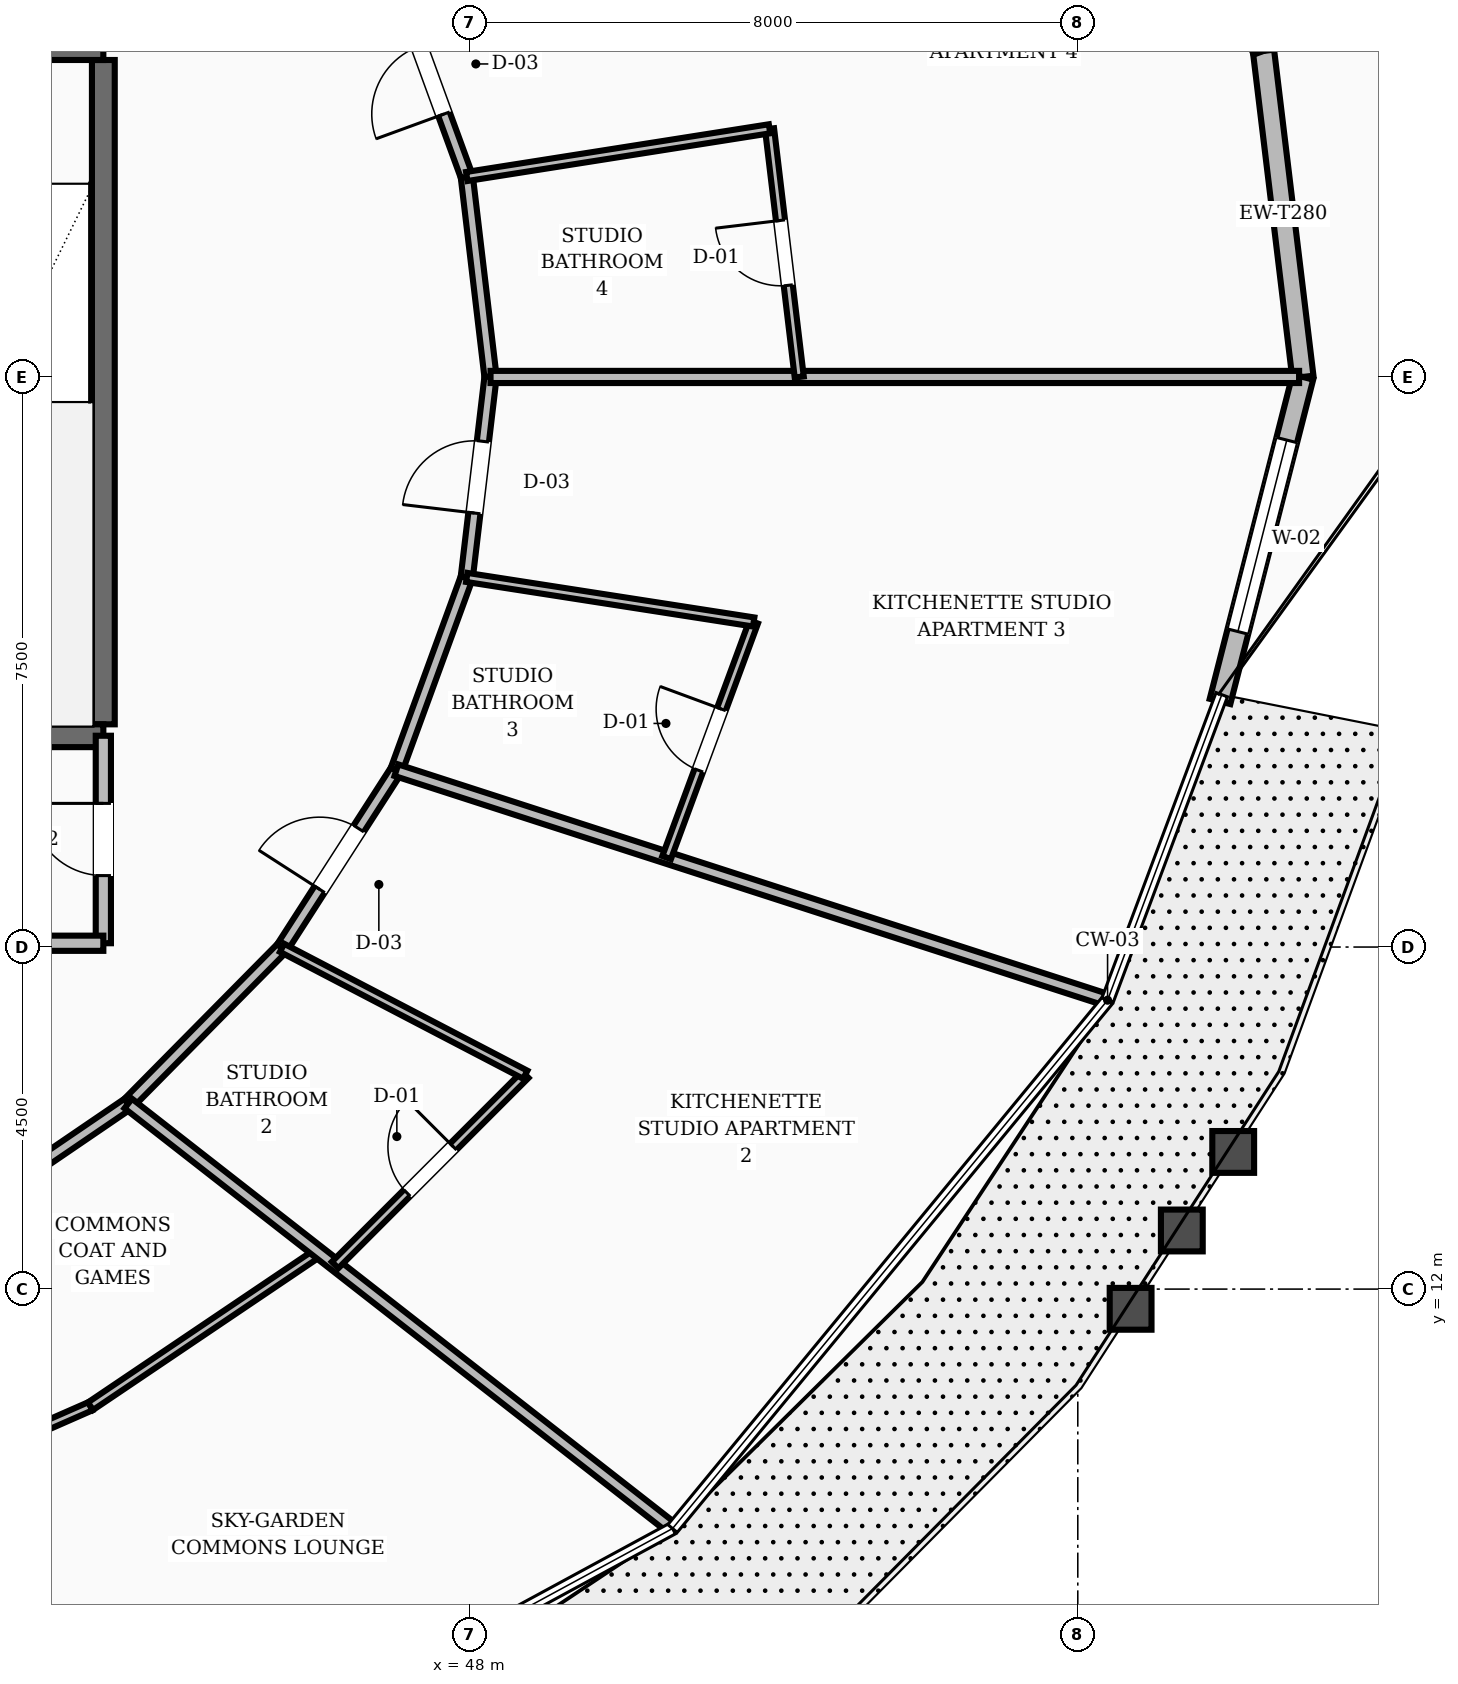
"""IFC4 building model, lengths in metres.
Left out: names, types, materials, properties, quantities, classifications, styles, units other than length and angle.
Written with IfcOpenShell. Run it as: python <this file> out.ifc"""

import sys

from ifc_helpers import new_model, si_unit, direction, frame, frame_2d, origin, place, context, subcontext, project, spatial, rectangle, extrude, element, fill, save


model = new_model("IFC4")
c1 = context("Model", 3, precision=1e-05, world=origin(), true_north=direction((0.0, 1.0)))
c2 = subcontext(c1, "Body", "Model", "MODEL_VIEW")
j1 = project(units=[si_unit("LENGTHUNIT", "METRE"), si_unit("PLANEANGLEUNIT", "RADIAN")], contexts=[c1])
p1 = place(None, origin())
s1 = spatial("IfcSite", under=j1, at=p1, CompositionType="ELEMENT")
p2 = place(p1, origin())
s2 = spatial("IfcBuilding", under=s1, at=p2, CompositionType="ELEMENT")
p3 = place(p2, frame((0.0, 0.0, 91.6)))
s3 = spatial("IfcBuildingStorey", under=s2, at=p3, CompositionType="ELEMENT", Elevation=91.6)
p4 = place(p3, frame((43.18, 19.43, 0.0), z_axis=(0.0, 0.0, 1.0), x_axis=(0.0, 1.0, 0.0)))
e1 = element("IfcWall", 1, at=p4, inside=s3, PredefinedType="SHEAR", context=c2, shape_type="SweptSolid", body=[
    extrude(rectangle(XDim=8.74, YDim=0.3, at=frame_2d((4.37, 0.0))), origin(), (0.0, 0.0, 1.0), 3.6),
])
p5 = place(p3, frame((39.58, 19.28, 0.0), z_axis=(0.0, 0.0, 1.0), x_axis=(1.0, 0.0, 0.0)))
e2 = element("IfcWall", 2, at=p5, inside=s3, PredefinedType="SHEAR", context=c2, shape_type="SweptSolid", body=[
    extrude(rectangle(XDim=3.6, YDim=0.3, at=frame_2d((1.8, 0.0))), origin(), (0.0, 0.0, 1.0), 3.6),
])
p6 = place(p3, frame((39.58, 28.32, 0.0), z_axis=(0.0, 0.0, 1.0), x_axis=(1.0, 0.0, 0.0)))
e3 = element("IfcWall", 3, at=p6, inside=s3, PredefinedType="SHEAR", context=c2, shape_type="SweptSolid", body=[
    extrude(rectangle(XDim=3.6, YDim=0.3, at=frame_2d((1.8, 0.0))), origin(), (0.0, 0.0, 1.0), 3.6),
])
p7 = place(p6, frame((1.3, 0.0, 0.0)))
e4 = element("IfcOpeningElement", 4, at=p7, cuts=e3, PredefinedType="OPENING", context=c2, shape_type="SweptSolid", body=[
    extrude(rectangle(XDim=1.1, YDim=2.1, at=frame_2d((0.55, 1.05))), frame((0.0, 0.16, 0.0), z_axis=(0.0, -1.0, 0.0), x_axis=(1.0, 0.0, 0.0)), (0.0, 0.0, 1.0), 0.32),
])
p8 = place(p3, frame((58.961, 24.0, 0.0), z_axis=(0.0, 0.0, 1.0), x_axis=(-0.11991619344, 0.992784018078, 0.0)))
e5 = element("IfcWall", 5, at=p8, inside=s3, PredefinedType="STANDARD", context=c2, shape_type="SweptSolid", body=[
    extrude(rectangle(XDim=4.32, YDim=0.28, at=frame_2d((2.16, 0.0))), origin(), (0.0, 0.0, 1.0), 2.71),
])
p9 = place(p3, frame((58.443, 28.289, 0.0), z_axis=(0.0, 0.0, 1.0), x_axis=(-0.348647575397, 0.937253897388, 0.0)))
e6 = element("IfcWall", 6, at=p9, inside=s3, PredefinedType="STANDARD", context=c2, shape_type="SweptSolid", body=[
    extrude(rectangle(XDim=4.4, YDim=0.28, at=frame_2d((2.2, 0.0))), origin(), (0.0, 0.0, 1.0), 2.71),
])
p10 = place(p9, frame((0.6, 0.0, 0.8)))
e7 = element("IfcOpeningElement", 7, at=p10, cuts=e6, PredefinedType="OPENING", context=c2, shape_type="SweptSolid", body=[
    extrude(rectangle(XDim=3.2, YDim=1.65, at=frame_2d((1.6, 0.825))), frame((0.0, 0.15, 0.0), z_axis=(0.0, -1.0, 0.0), x_axis=(1.0, 0.0, 0.0)), (0.0, 0.0, 1.0), 0.3),
])
p11 = place(p3, frame((57.871, 19.731, 0.0), z_axis=(0.0, 0.0, 1.0), x_axis=(0.247421985174, 0.968907818759, 0.0)))
e8 = element("IfcWall", 8, at=p11, inside=s3, PredefinedType="STANDARD", context=c2, shape_type="SweptSolid", body=[
    extrude(rectangle(XDim=4.406, YDim=0.28, at=frame_2d((2.203, 0.0))), origin(), (0.0, 0.0, 1.0), 2.71),
])
p12 = place(p11, frame((0.949, 0.0, 0.8)))
e9 = element("IfcOpeningElement", 9, at=p12, cuts=e8, PredefinedType="OPENING", context=c2, shape_type="SweptSolid", body=[
    extrude(rectangle(XDim=2.6, YDim=1.65, at=frame_2d((1.3, 0.825))), frame((0.0, 0.15, 0.0), z_axis=(0.0, -1.0, 0.0), x_axis=(1.0, 0.0, 0.0)), (0.0, 0.0, 1.0), 0.3),
])
p13 = place(p3, frame((43.18, 16.55, 0.0), z_axis=(0.0, 0.0, 1.0), x_axis=(0.0, 1.0, 0.0)))
e10 = element("IfcWall", 10, at=p13, inside=s3, PredefinedType="SOLIDWALL", context=c2, shape_type="SweptSolid", body=[
    extrude(rectangle(XDim=2.73, YDim=0.2, at=frame_2d((1.365, 0.0))), origin(), (0.0, 0.0, 1.0), 2.71),
])
p14 = place(p13, frame((0.89, 0.0, 0.0)))
e11 = element("IfcOpeningElement", 11, at=p14, cuts=e10, PredefinedType="OPENING", context=c2, shape_type="SweptSolid", body=[
    extrude(rectangle(XDim=0.95, YDim=2.1, at=frame_2d((0.475, 1.05))), frame((0.0, 0.11, 0.0), z_axis=(0.0, -1.0, 0.0), x_axis=(1.0, 0.0, 0.0)), (0.0, 0.0, 1.0), 0.22),
])
p15 = place(p3, frame((39.2, 16.55, 0.0), z_axis=(0.0, 0.0, 1.0), x_axis=(1.0, 0.0, 0.0)))
e12 = element("IfcWall", 12, at=p15, inside=s3, PredefinedType="SOLIDWALL", context=c2, shape_type="SweptSolid", body=[
    extrude(rectangle(XDim=3.98, YDim=0.2, at=frame_2d((1.99, 0.0))), origin(), (0.0, 0.0, 1.0), 2.71),
])
p16 = place(p3, frame((48.274, 24.0, 0.0), z_axis=(0.0, 0.0, 1.0), x_axis=(-0.117763961213, 0.99304161516, 0.0)))
e13 = element("IfcWall", 13, at=p16, inside=s3, PredefinedType="SOLIDWALL", context=c2, shape_type="SweptSolid", body=[
    extrude(rectangle(XDim=2.656, YDim=0.16, at=frame_2d((1.328, 0.0))), origin(), (0.0, 0.0, 1.0), 2.71),
])
p17 = place(p3, frame((47.961, 26.637, 0.0), z_axis=(0.0, 0.0, 1.0), x_axis=(-0.343013437329, 0.939330496583, 0.0)))
e14 = element("IfcWall", 14, at=p17, inside=s3, PredefinedType="SOLIDWALL", context=c2, shape_type="SweptSolid", body=[
    extrude(rectangle(XDim=2.7, YDim=0.16, at=frame_2d((1.35, 0.0))), origin(), (0.0, 0.0, 1.0), 2.71),
])
p18 = place(p17, frame((0.875, 0.0, 0.0)))
e15 = element("IfcOpeningElement", 15, at=p18, cuts=e14, PredefinedType="OPENING", context=c2, shape_type="SweptSolid", body=[
    extrude(rectangle(XDim=0.95, YDim=2.1, at=frame_2d((0.475, 1.05))), frame((0.0, 0.09, 0.0), z_axis=(0.0, -1.0, 0.0), x_axis=(1.0, 0.0, 0.0)), (0.0, 0.0, 1.0), 0.18),
])
p19 = place(p3, frame((41.041, 12.76, 0.0), z_axis=(0.0, 0.0, 1.0), x_axis=(0.826293096206, 0.56324037423, 0.0)))
e16 = element("IfcWall", 16, at=p19, inside=s3, PredefinedType="SOLIDWALL", context=c2, shape_type="SweptSolid", body=[
    extrude(rectangle(XDim=2.985, YDim=0.16, at=frame_2d((1.492, 0.0))), origin(), (0.0, 0.0, 1.0), 2.71),
])
p20 = place(p3, frame((43.508, 14.441, 0.0), z_axis=(0.0, 0.0, 1.0), x_axis=(0.702811997, 0.711375636969, 0.0)))
e17 = element("IfcWall", 17, at=p20, inside=s3, PredefinedType="SOLIDWALL", context=c2, shape_type="SweptSolid", body=[
    extrude(rectangle(XDim=2.879, YDim=0.16, at=frame_2d((1.44, 0.0))), origin(), (0.0, 0.0, 1.0), 2.71),
])
p21 = place(p3, frame((45.531, 16.49, 0.0), z_axis=(0.0, 0.0, 1.0), x_axis=(0.541126045017, 0.840941498206, 0.0)))
e18 = element("IfcWall", 18, at=p21, inside=s3, PredefinedType="SOLIDWALL", context=c2, shape_type="SweptSolid", body=[
    extrude(rectangle(XDim=2.779, YDim=0.16, at=frame_2d((1.39, 0.0))), origin(), (0.0, 0.0, 1.0), 2.71),
])
p22 = place(p21, frame((0.915, 0.0, 0.0)))
e19 = element("IfcOpeningElement", 19, at=p22, cuts=e18, PredefinedType="OPENING", context=c2, shape_type="SweptSolid", body=[
    extrude(rectangle(XDim=0.95, YDim=2.1, at=frame_2d((0.475, 1.05))), frame((0.0, 0.09, 0.0), z_axis=(0.0, -1.0, 0.0), x_axis=(1.0, 0.0, 0.0)), (0.0, 0.0, 1.0), 0.18),
])
p23 = place(p3, frame((47.035, 18.827, 0.0), z_axis=(0.0, 0.0, 1.0), x_axis=(0.343013437329, 0.939330496583, 0.0)))
e20 = element("IfcWall", 20, at=p23, inside=s3, PredefinedType="SOLIDWALL", context=c2, shape_type="SweptSolid", body=[
    extrude(rectangle(XDim=2.7, YDim=0.16, at=frame_2d((1.35, 0.0))), origin(), (0.0, 0.0, 1.0), 2.71),
])
p24 = place(p3, frame((47.961, 21.363, 0.0), z_axis=(0.0, 0.0, 1.0), x_axis=(0.117763961213, 0.99304161516, 0.0)))
e21 = element("IfcWall", 21, at=p24, inside=s3, PredefinedType="SOLIDWALL", context=c2, shape_type="SweptSolid", body=[
    extrude(rectangle(XDim=2.656, YDim=0.16, at=frame_2d((1.328, 0.0))), origin(), (0.0, 0.0, 1.0), 2.71),
])
p25 = place(p24, frame((0.853, 0.0, 0.0)))
e22 = element("IfcOpeningElement", 22, at=p25, cuts=e21, PredefinedType="OPENING", context=c2, shape_type="SweptSolid", body=[
    extrude(rectangle(XDim=0.95, YDim=2.1, at=frame_2d((0.475, 1.05))), frame((0.0, 0.09, 0.0), z_axis=(0.0, -1.0, 0.0), x_axis=(1.0, 0.0, 0.0)), (0.0, 0.0, 1.0), 0.18),
])
p26 = place(p3, frame((39.584, 8.954, 0.0), z_axis=(0.0, 0.0, 1.0), x_axis=(0.915554398316, 0.402194161723, 0.0)))
e23 = element("IfcWall", 23, at=p26, inside=s3, PredefinedType="PARTITIONING", context=c2, shape_type="SweptSolid", body=[
    extrude(rectangle(XDim=3.742, YDim=0.12, at=frame_2d((1.871, 0.0))), origin(), (0.0, 0.0, 1.0), 2.71),
])
p27 = place(p3, frame((43.01, 10.459, 0.0), z_axis=(0.0, 0.0, 1.0), x_axis=(0.829125166248, 0.559063018536, 0.0)))
e24 = element("IfcWall", 24, at=p27, inside=s3, PredefinedType="PARTITIONING", context=c2, shape_type="SweptSolid", body=[
    extrude(rectangle(XDim=3.622, YDim=0.12, at=frame_2d((1.811, 0.0))), origin(), (0.0, 0.0, 1.0), 2.71),
])
p28 = place(p3, frame((43.508, 14.441, 0.0), z_axis=(0.0, 0.0, 1.0), x_axis=(0.788218918979, -0.615394942914, 0.0)))
e25 = element("IfcWall", 25, at=p28, inside=s3, PredefinedType="SOLIDWALL", context=c2, shape_type="SweptSolid", body=[
    extrude(rectangle(XDim=9.035, YDim=0.16, at=frame_2d((4.518, 0.0))), origin(), (0.0, 0.0, 1.0), 2.71),
])
p29 = place(p3, frame((46.229, 12.317, 0.0), z_axis=(0.0, 0.0, 1.0), x_axis=(0.7068998534, 0.707313648436, 0.0)))
e26 = element("IfcWall", 26, at=p29, inside=s3, PredefinedType="PARTITIONING", context=c2, shape_type="SweptSolid", body=[
    extrude(rectangle(XDim=3.54, YDim=0.12, at=frame_2d((1.77, 0.0))), origin(), (0.0, 0.0, 1.0), 2.71),
])
p30 = place(p29, frame((1.34, 0.0, 0.0)))
e27 = element("IfcOpeningElement", 27, at=p30, cuts=e26, PredefinedType="OPENING", context=c2, shape_type="SweptSolid", body=[
    extrude(rectangle(XDim=0.86, YDim=2.1, at=frame_2d((0.43, 1.05))), frame((0.0, 0.07, 0.0), z_axis=(0.0, -1.0, 0.0), x_axis=(1.0, 0.0, 0.0)), (0.0, 0.0, 1.0), 0.14),
])
p31 = place(p3, frame((45.531, 16.49, 0.0), z_axis=(0.0, 0.0, 1.0), x_axis=(0.886624645958, -0.462489715756, 0.0)))
e28 = element("IfcWall", 28, at=p31, inside=s3, PredefinedType="PARTITIONING", context=c2, shape_type="SweptSolid", body=[
    extrude(rectangle(XDim=3.609, YDim=0.12, at=frame_2d((1.805, 0.0))), origin(), (0.0, 0.0, 1.0), 2.71),
])
p32 = place(p3, frame((47.035, 18.827, 0.0), z_axis=(0.0, 0.0, 1.0), x_axis=(0.951482342418, -0.307703350757, 0.0)))
e29 = element("IfcWall", 29, at=p32, inside=s3, PredefinedType="SOLIDWALL", context=c2, shape_type="SweptSolid", body=[
    extrude(rectangle(XDim=9.784, YDim=0.16, at=frame_2d((4.892, 0.0))), origin(), (0.0, 0.0, 1.0), 2.71),
])
p33 = place(p3, frame((50.591, 17.677, 0.0), z_axis=(0.0, 0.0, 1.0), x_axis=(0.346520124716, 0.938042538037, 0.0)))
e30 = element("IfcWall", 30, at=p33, inside=s3, PredefinedType="PARTITIONING", context=c2, shape_type="SweptSolid", body=[
    extrude(rectangle(XDim=3.304, YDim=0.12, at=frame_2d((1.652, 0.0))), origin(), (0.0, 0.0, 1.0), 2.71),
])
p34 = place(p33, frame((1.222, 0.0, 0.0)))
e31 = element("IfcOpeningElement", 31, at=p34, cuts=e30, PredefinedType="OPENING", context=c2, shape_type="SweptSolid", body=[
    extrude(rectangle(XDim=0.86, YDim=2.1, at=frame_2d((0.43, 1.05))), frame((0.0, 0.07, 0.0), z_axis=(0.0, -1.0, 0.0), x_axis=(1.0, 0.0, 0.0)), (0.0, 0.0, 1.0), 0.14),
])
p35 = place(p3, frame((47.961, 21.363, 0.0), z_axis=(0.0, 0.0, 1.0), x_axis=(0.988155696558, -0.153454616612, 0.0)))
e32 = element("IfcWall", 32, at=p35, inside=s3, PredefinedType="PARTITIONING", context=c2, shape_type="SweptSolid", body=[
    extrude(rectangle(XDim=3.82, YDim=0.12, at=frame_2d((1.91, 0.0))), origin(), (0.0, 0.0, 1.0), 2.71),
])
p36 = place(p3, frame((48.274, 24.0, 0.0), z_axis=(0.0, 0.0, 1.0), x_axis=(1.0, 0.0, 0.0)))
e33 = element("IfcWall", 33, at=p36, inside=s3, PredefinedType="SOLIDWALL", context=c2, shape_type="SweptSolid", body=[
    extrude(rectangle(XDim=10.638, YDim=0.16, at=frame_2d((5.319, 0.0))), origin(), (0.0, 0.0, 1.0), 2.71),
])
p37 = place(p3, frame((52.335, 24.0, 0.0), z_axis=(0.0, 0.0, 1.0), x_axis=(-0.118796809784, 0.992918585779, 0.0)))
e34 = element("IfcWall", 34, at=p37, inside=s3, PredefinedType="PARTITIONING", context=c2, shape_type="SweptSolid", body=[
    extrude(rectangle(XDim=3.288, YDim=0.12, at=frame_2d((1.644, 0.0))), origin(), (0.0, 0.0, 1.0), 2.71),
])
p38 = place(p37, frame((1.214, 0.0, 0.0)))
e35 = element("IfcOpeningElement", 35, at=p38, cuts=e34, PredefinedType="OPENING", context=c2, shape_type="SweptSolid", body=[
    extrude(rectangle(XDim=0.86, YDim=2.1, at=frame_2d((0.43, 1.05))), frame((0.0, 0.07, 0.0), z_axis=(0.0, -1.0, 0.0), x_axis=(1.0, 0.0, 0.0)), (0.0, 0.0, 1.0), 0.14),
])
p39 = place(p3, frame((47.961, 26.637, 0.0), z_axis=(0.0, 0.0, 1.0), x_axis=(0.987811515009, 0.155654780895, 0.0)))
e36 = element("IfcWall", 36, at=p39, inside=s3, PredefinedType="PARTITIONING", context=c2, shape_type="SweptSolid", body=[
    extrude(rectangle(XDim=4.032, YDim=0.12, at=frame_2d((2.016, 0.0))), origin(), (0.0, 0.0, 1.0), 2.71),
])
p40 = place(p12, origin())
e37 = element("IfcWindow", 37, at=p40, inside=s3, PartitioningType="SINGLE_PANEL", PredefinedType="WINDOW", context=c2, shape_type="SweptSolid", body=[
    extrude(rectangle(XDim=2.6, YDim=1.65, at=frame_2d((1.3, 0.825))), frame((0.0, 0.03, 0.0), z_axis=(0.0, -1.0, 0.0), x_axis=(1.0, 0.0, 0.0)), (0.0, 0.0, 1.0), 0.06),
])
fill(e9, e37)
p41 = place(p14, origin())
e38 = element("IfcDoor", 38, at=p41, inside=s3, OperationType="SINGLE_SWING_RIGHT", PredefinedType="DOOR", context=c2, shape_type="SweptSolid", body=[
    extrude(rectangle(XDim=0.95, YDim=2.1, at=frame_2d((0.475, 1.05))), frame((0.0, 0.025, 0.0), z_axis=(0.0, -1.0, 0.0), x_axis=(1.0, 0.0, 0.0)), (0.0, 0.0, 1.0), 0.05),
])
fill(e11, e38)
p42 = place(p30, origin())
e39 = element("IfcDoor", 39, at=p42, inside=s3, OperationType="SINGLE_SWING_RIGHT", PredefinedType="DOOR", context=c2, shape_type="SweptSolid", body=[
    extrude(rectangle(XDim=0.86, YDim=2.1, at=frame_2d((0.43, 1.05))), frame((0.0, 0.025, 0.0), z_axis=(0.0, -1.0, 0.0), x_axis=(1.0, 0.0, 0.0)), (0.0, 0.0, 1.0), 0.05),
])
fill(e27, e39)
p43 = place(p22, origin())
e40 = element("IfcDoor", 40, at=p43, inside=s3, OperationType="SINGLE_SWING_LEFT", PredefinedType="DOOR", context=c2, shape_type="SweptSolid", body=[
    extrude(rectangle(XDim=0.95, YDim=2.1, at=frame_2d((0.475, 1.05))), frame((0.0, 0.025, 0.0), z_axis=(0.0, -1.0, 0.0), x_axis=(1.0, 0.0, 0.0)), (0.0, 0.0, 1.0), 0.05),
])
fill(e19, e40)
p44 = place(p34, origin())
e41 = element("IfcDoor", 41, at=p44, inside=s3, OperationType="SINGLE_SWING_RIGHT", PredefinedType="DOOR", context=c2, shape_type="SweptSolid", body=[
    extrude(rectangle(XDim=0.86, YDim=2.1, at=frame_2d((0.43, 1.05))), frame((0.0, 0.025, 0.0), z_axis=(0.0, -1.0, 0.0), x_axis=(1.0, 0.0, 0.0)), (0.0, 0.0, 1.0), 0.05),
])
fill(e31, e41)
p45 = place(p25, origin())
e42 = element("IfcDoor", 42, at=p45, inside=s3, OperationType="SINGLE_SWING_LEFT", PredefinedType="DOOR", context=c2, shape_type="SweptSolid", body=[
    extrude(rectangle(XDim=0.95, YDim=2.1, at=frame_2d((0.475, 1.05))), frame((0.0, 0.025, 0.0), z_axis=(0.0, -1.0, 0.0), x_axis=(1.0, 0.0, 0.0)), (0.0, 0.0, 1.0), 0.05),
])
fill(e22, e42)
p46 = place(p38, origin())
e43 = element("IfcDoor", 43, at=p46, inside=s3, OperationType="SINGLE_SWING_RIGHT", PredefinedType="DOOR", context=c2, shape_type="SweptSolid", body=[
    extrude(rectangle(XDim=0.86, YDim=2.1, at=frame_2d((0.43, 1.05))), frame((0.0, 0.025, 0.0), z_axis=(0.0, -1.0, 0.0), x_axis=(1.0, 0.0, 0.0)), (0.0, 0.0, 1.0), 0.05),
])
fill(e35, e43)
p47 = place(p18, origin())
e44 = element("IfcDoor", 44, at=p47, inside=s3, OperationType="SINGLE_SWING_LEFT", PredefinedType="DOOR", context=c2, shape_type="SweptSolid", body=[
    extrude(rectangle(XDim=0.95, YDim=2.1, at=frame_2d((0.475, 1.05))), frame((0.0, 0.025, 0.0), z_axis=(0.0, -1.0, 0.0), x_axis=(1.0, 0.0, 0.0)), (0.0, 0.0, 1.0), 0.05),
])
fill(e15, e44)
save(model, sys.argv[1])
